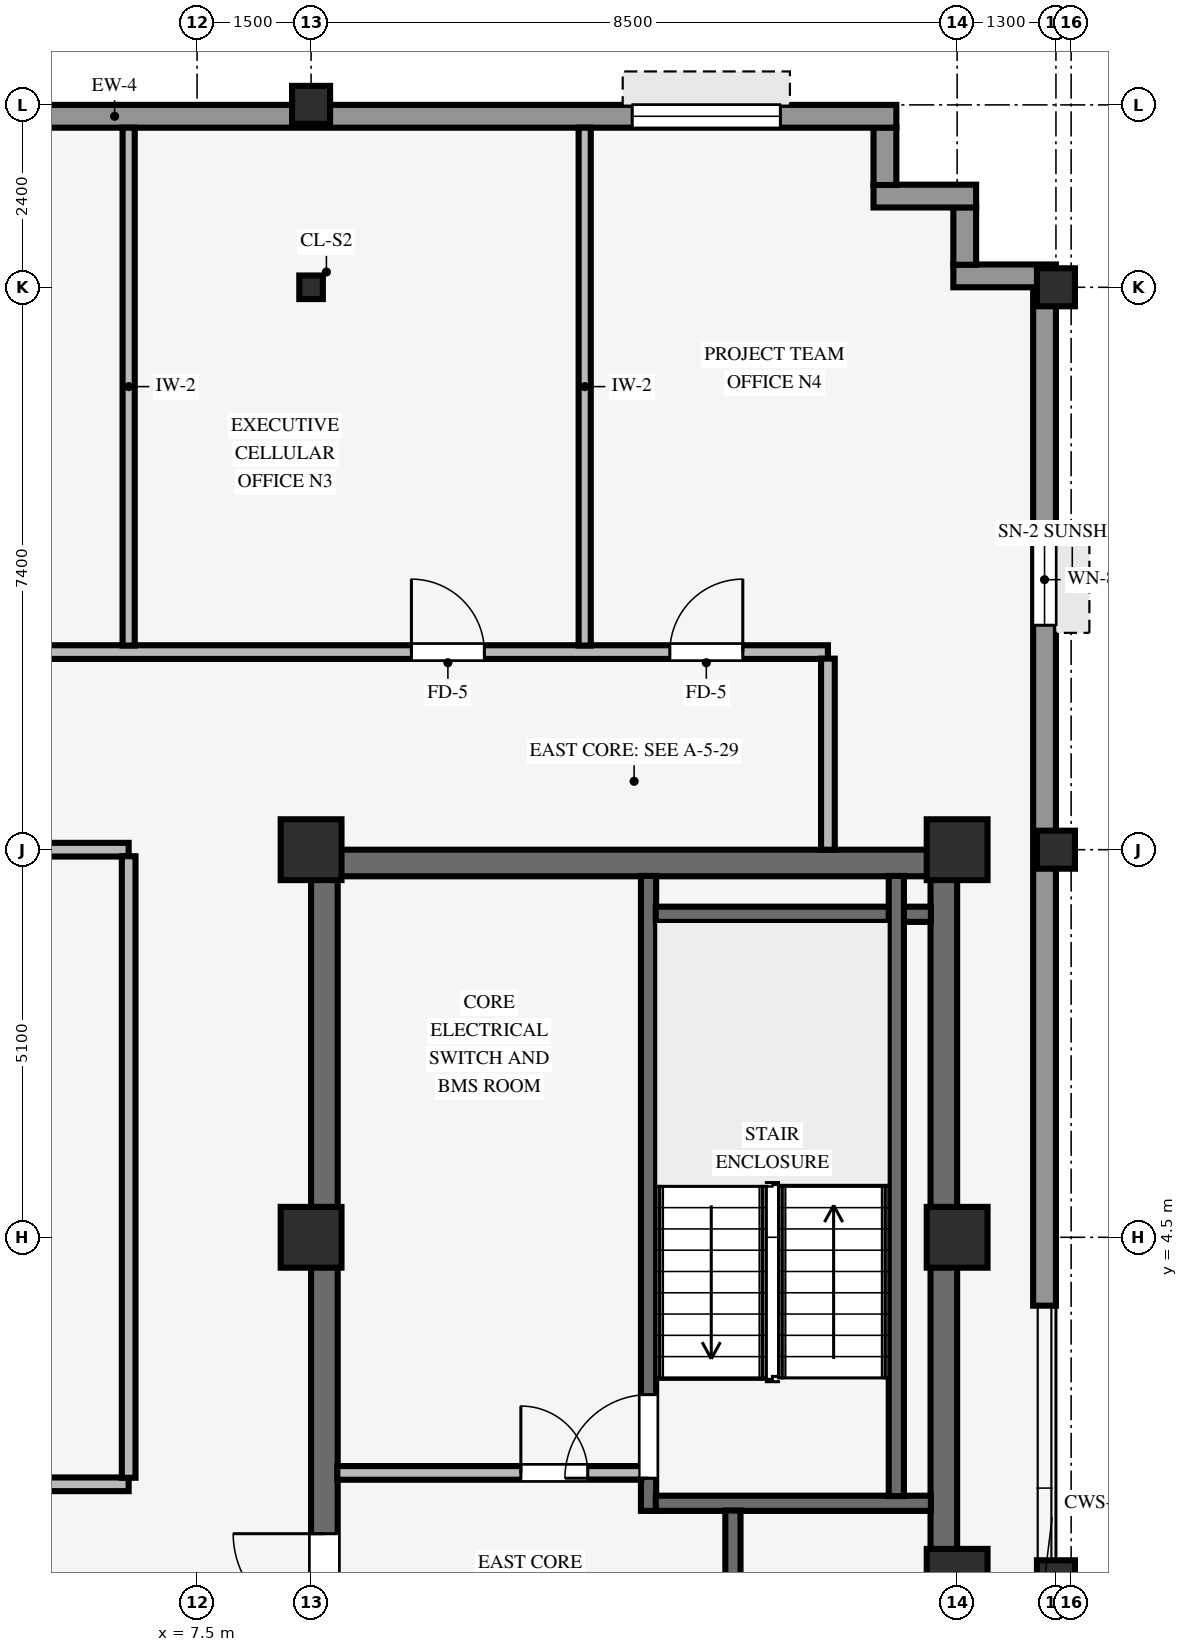
"""IFC4 building model, lengths in metres.
Left out: names, types, materials, properties, quantities, classifications, styles, units other than length and angle.
Written with IfcOpenShell. Run it as: python <this file> out.ifc"""

import sys

from ifc_helpers import new_model, si_unit, direction, frame, frame_2d, origin, origin_2d, place, context, subcontext, project, spatial, rectangle, hollow_rectangle, i_section, extrude, source, transform, mapped, element, fill, save


model = new_model("IFC4")
c1 = context("Model", 3, precision=1e-05, world=origin(), true_north=direction((0.0, 1.0)))
c2 = subcontext(c1, "Body", "Model", "MODEL_VIEW")
j1 = project(units=[si_unit("LENGTHUNIT", "METRE"), si_unit("PLANEANGLEUNIT", "RADIAN")], contexts=[c1])
p1 = place(None, origin())
s1 = spatial("IfcSite", under=j1, at=p1, CompositionType="ELEMENT")
p2 = place(p1, origin())
s2 = spatial("IfcBuilding", under=s1, at=p2, CompositionType="ELEMENT")
p3 = place(p2, frame((0.0, 0.0, 245.65)))
s3 = spatial("IfcBuildingStorey", under=s2, at=p3, CompositionType="ELEMENT", Elevation=245.65)
p4 = place(p3, frame((9.0, 9.425, 0.0), z_axis=(0.0, 0.0, 1.0), x_axis=(1.0, 0.0, 0.0)))
e1 = element("IfcWall", 1, at=p4, inside=s3, PredefinedType="SHEAR", context=c2, shape_type="SweptSolid", body=[
    extrude(rectangle(XDim=8.5, YDim=0.35, at=frame_2d((4.25, 0.0))), origin(), (0.0, 0.0, 1.0), 3.37),
])
p5 = place(p3, frame((9.175, -9.255, 0.0), z_axis=(0.0, 0.0, 1.0), x_axis=(0.0, 1.0, 0.0)))
e2 = element("IfcWall", 2, at=p5, inside=s3, PredefinedType="SHEAR", context=c2, shape_type="SweptSolid", body=[
    extrude(rectangle(XDim=18.51, YDim=0.35, at=frame_2d((9.255, 0.0))), origin(), (0.0, 0.0, 1.0), 3.37),
])
p6 = place(p5, frame((8.655, 0.0, 0.0)))
e3 = element("IfcOpeningElement", 3, at=p6, cuts=e2, PredefinedType="OPENING", context=c2, shape_type="SweptSolid", body=[
    extrude(rectangle(XDim=1.2, YDim=2.15, at=frame_2d((0.6, 1.075))), frame((0.0, 0.185, 0.0), z_axis=(0.0, -1.0, 0.0), x_axis=(1.0, 0.0, 0.0)), (0.0, 0.0, 1.0), 0.37),
])
p7 = place(p3, frame((17.325, -9.255, 0.0), z_axis=(0.0, 0.0, 1.0), x_axis=(0.0, 1.0, 0.0)))
e4 = element("IfcWall", 4, at=p7, inside=s3, PredefinedType="SHEAR", context=c2, shape_type="SweptSolid", body=[
    extrude(rectangle(XDim=18.51, YDim=0.35, at=frame_2d((9.255, 0.0))), origin(), (0.0, 0.0, 1.0), 3.37),
])
for number, where, z_axis, x_axis in (
    (5, (9.0, 4.5, 0.0), (0.0, 0.0, 1.0), (1.0, 0.0, 0.0)),
    (6, (9.0, 9.6, 0.0), (0.0, 0.0, 1.0), (1.0, 0.0, 0.0)),
    (7, (17.5, 4.5, 0.0), (0.0, 0.0, 1.0), (1.0, 0.0, 0.0)),
    (8, (17.5, 9.6, 0.0), (0.0, 0.0, 1.0), (1.0, 0.0, 0.0)),
    (9, (17.5, 0.0, 0.0), (0.0, 0.0, 1.0), (1.0, 0.0, 0.0)),
):
    element("IfcColumn", number, at=place(p3, frame(where, z_axis=z_axis, x_axis=x_axis)), inside=s3, PredefinedType="COLUMN", context=c2, shape_type="SweptSolid", body=[
        extrude(rectangle(XDim=0.8, YDim=0.8, at=origin_2d()), origin(), (0.0, 0.0, 1.0), 3.37),
    ])
for number, where, z_axis, x_axis in (
    (10, (18.8, 0.0, 0.0), (0.0, 0.0, 1.0), (1.0, 0.0, 0.0)),
    (11, (18.8, 9.6, 0.0), (0.0, 0.0, 1.0), (1.0, 0.0, 0.0)),
    (12, (18.8, 17.0, 0.0), (0.0, 0.0, 1.0), (1.0, 0.0, 0.0)),
    (13, (9.0, 19.4, 0.0), (0.0, 0.0, 1.0), (1.0, 0.0, 0.0)),
):
    element("IfcColumn", number, at=place(p3, frame(where, z_axis=z_axis, x_axis=x_axis)), inside=s3, PredefinedType="COLUMN", context=c2, shape_type="SweptSolid", body=[
        extrude(hollow_rectangle(XDim=0.5, YDim=0.5, WallThickness=0.032, InnerFilletRadius=0.032, OuterFilletRadius=0.064, at=origin_2d()), origin(), (0.0, 0.0, 1.0), 3.37),
    ])
p8 = place(p3, frame((9.0, 17.0, 0.0), z_axis=(0.0, 0.0, 1.0), x_axis=(1.0, 0.0, 0.0)))
e14 = element("IfcColumn", 14, at=p8, inside=s3, PredefinedType="COLUMN", context=c2, shape_type="SweptSolid", body=[
    extrude(i_section(OverallWidth=0.31, OverallDepth=0.31, WebThickness=0.015, FlangeThickness=0.015, FilletRadius=0.015, at=origin_2d()), origin(), (0.0, 0.0, 1.0), 3.37),
])
p9 = place(p3, frame((18.65, 3.6, 0.0), z_axis=(0.0, 0.0, 1.0), x_axis=(0.0, 1.0, 0.0)))
e15 = element("IfcWall", 15, at=p9, inside=s3, PredefinedType="STANDARD", context=c2, shape_type="SweptSolid", body=[
    extrude(rectangle(XDim=13.404, YDim=0.3, at=frame_2d((6.702, 0.0))), origin(), (0.0, 0.0, 1.0), 2.705),
])
p10 = place(p9, frame((8.953, 0.0, 0.8)))
e16 = element("IfcOpeningElement", 16, at=p10, cuts=e15, PredefinedType="OPENING", context=c2, shape_type="SweptSolid", body=[
    extrude(rectangle(XDim=1.2, YDim=1.48, at=frame_2d((0.6, 0.74))), frame((0.0, 0.16, 0.0), z_axis=(0.0, -1.0, 0.0), x_axis=(1.0, 0.0, 0.0)), (0.0, 0.0, 1.0), 0.32),
])
p11 = place(p3, frame((17.45, 17.15, 0.0), z_axis=(0.0, 0.0, 1.0), x_axis=(1.0, 0.0, 0.0)))
e17 = element("IfcWall", 17, at=p11, inside=s3, PredefinedType="STANDARD", context=c2, shape_type="SweptSolid", body=[
    extrude(rectangle(XDim=1.35, YDim=0.3, at=frame_2d((0.675, 0.0))), origin(), (0.0, 0.0, 1.0), 2.892),
])
p12 = place(p3, frame((17.6, 17.296, 0.0), z_axis=(0.0, 0.0, 1.0), x_axis=(0.0, 1.0, 0.0)))
e18 = element("IfcWall", 18, at=p12, inside=s3, PredefinedType="STANDARD", context=c2, shape_type="SweptSolid", body=[
    extrude(rectangle(XDim=0.758, YDim=0.3, at=frame_2d((0.379, 0.0))), origin(), (0.0, 0.0, 1.0), 2.892),
])
p13 = place(p3, frame((16.4, 18.2, 0.0), z_axis=(0.0, 0.0, 1.0), x_axis=(1.0, 0.0, 0.0)))
e19 = element("IfcWall", 19, at=p13, inside=s3, PredefinedType="STANDARD", context=c2, shape_type="SweptSolid", body=[
    extrude(rectangle(XDim=1.35, YDim=0.3, at=frame_2d((0.675, 0.0))), origin(), (0.0, 0.0, 1.0), 2.892),
])
p14 = place(p3, frame((16.55, 18.346, 0.0), z_axis=(0.0, 0.0, 1.0), x_axis=(0.0, 1.0, 0.0)))
e20 = element("IfcWall", 20, at=p14, inside=s3, PredefinedType="STANDARD", context=c2, shape_type="SweptSolid", body=[
    extrude(rectangle(XDim=0.758, YDim=0.3, at=frame_2d((0.379, 0.0))), origin(), (0.0, 0.0, 1.0), 2.892),
])
p15 = place(p3, frame((-18.9, 19.25, 0.0), z_axis=(0.0, 0.0, 1.0), x_axis=(1.0, 0.0, 0.0)))
e21 = element("IfcWall", 21, at=p15, inside=s3, PredefinedType="STANDARD", context=c2, shape_type="SweptSolid", body=[
    extrude(rectangle(XDim=35.6, YDim=0.3, at=frame_2d((17.8, 0.0))), origin(), (0.0, 0.0, 1.0), 2.705),
])
p16 = place(p15, frame((13.6, 0.0, 0.0)))
e22 = element("IfcOpeningElement", 22, at=p16, cuts=e21, PredefinedType="OPENING", context=c2, shape_type="SweptSolid", body=[
    extrude(rectangle(XDim=0.98, YDim=2.15, at=frame_2d((0.49, 1.075))), frame((0.0, 0.16, 0.0), z_axis=(0.0, -1.0, 0.0), x_axis=(1.0, 0.0, 0.0)), (0.0, 0.0, 1.0), 0.32),
])
p17 = place(p15, frame((2.425, 0.0, 0.8)))
e23 = element("IfcOpeningElement", 23, at=p17, cuts=e21, PredefinedType="OPENING", context=c2, shape_type="SweptSolid", body=[
    extrude(rectangle(XDim=1.95, YDim=1.48, at=frame_2d((0.975, 0.74))), frame((0.0, 0.16, 0.0), z_axis=(0.0, -1.0, 0.0), x_axis=(1.0, 0.0, 0.0)), (0.0, 0.0, 1.0), 0.32),
])
p18 = place(p15, frame((7.225, 0.0, 0.8)))
e24 = element("IfcOpeningElement", 24, at=p18, cuts=e21, PredefinedType="OPENING", context=c2, shape_type="SweptSolid", body=[
    extrude(rectangle(XDim=1.95, YDim=1.48, at=frame_2d((0.975, 0.74))), frame((0.0, 0.16, 0.0), z_axis=(0.0, -1.0, 0.0), x_axis=(1.0, 0.0, 0.0)), (0.0, 0.0, 1.0), 0.32),
])
p19 = place(p15, frame((15.925, 0.0, 0.8)))
e25 = element("IfcOpeningElement", 25, at=p19, cuts=e21, PredefinedType="OPENING", context=c2, shape_type="SweptSolid", body=[
    extrude(rectangle(XDim=1.95, YDim=1.48, at=frame_2d((0.975, 0.74))), frame((0.0, 0.16, 0.0), z_axis=(0.0, -1.0, 0.0), x_axis=(1.0, 0.0, 0.0)), (0.0, 0.0, 1.0), 0.32),
])
p20 = place(p15, frame((21.625, 0.0, 0.8)))
e26 = element("IfcOpeningElement", 26, at=p20, cuts=e21, PredefinedType="OPENING", context=c2, shape_type="SweptSolid", body=[
    extrude(rectangle(XDim=1.95, YDim=1.48, at=frame_2d((0.975, 0.74))), frame((0.0, 0.16, 0.0), z_axis=(0.0, -1.0, 0.0), x_axis=(1.0, 0.0, 0.0)), (0.0, 0.0, 1.0), 0.32),
])
p21 = place(p15, frame((32.125, 0.0, 0.8)))
e27 = element("IfcOpeningElement", 27, at=p21, cuts=e21, PredefinedType="OPENING", context=c2, shape_type="SweptSolid", body=[
    extrude(rectangle(XDim=1.95, YDim=1.48, at=frame_2d((0.975, 0.74))), frame((0.0, 0.16, 0.0), z_axis=(0.0, -1.0, 0.0), x_axis=(1.0, 0.0, 0.0)), (0.0, 0.0, 1.0), 0.32),
])
p22 = place(p3, frame((13.44, 0.9, 0.0), z_axis=(0.0, 0.0, 1.0), x_axis=(0.0, 1.0, 0.0)))
e28 = element("IfcWall", 28, at=p22, inside=s3, PredefinedType="SHEAR", context=c2, shape_type="SweptSolid", body=[
    extrude(rectangle(XDim=8.355, YDim=0.2, at=frame_2d((4.177, 0.0))), origin(), (0.0, 0.0, 1.0), 3.37),
])
p23 = place(p22, frame((0.43, 0.0, 0.0)))
e29 = element("IfcOpeningElement", 29, at=p23, cuts=e28, PredefinedType="OPENING", context=c2, shape_type="SweptSolid", body=[
    extrude(rectangle(XDim=1.1, YDim=2.15, at=frame_2d((0.55, 1.075))), frame((0.0, 0.11, 0.0), z_axis=(0.0, -1.0, 0.0), x_axis=(1.0, 0.0, 0.0)), (0.0, 0.0, 1.0), 0.22),
])
for number, where, z_axis, x_axis in (
    (30, (13.535, 1.0, 0.0), (0.0, 0.0, 1.0), (1.0, 0.0, 0.0)),
    (31, (13.535, 8.75, 0.0), (0.0, 0.0, 1.0), (1.0, 0.0, 0.0)),
):
    element("IfcWall", number, at=place(p3, frame(where, z_axis=z_axis, x_axis=x_axis)), inside=s3, PredefinedType="SHEAR", context=c2, shape_type="SweptSolid", body=[
        extrude(rectangle(XDim=3.62, YDim=0.2, at=frame_2d((1.81, 0.0))), origin(), (0.0, 0.0, 1.0), 3.37),
    ])
p24 = place(p3, frame((16.7, 1.095, 0.0), z_axis=(0.0, 0.0, 1.0), x_axis=(0.0, 1.0, 0.0)))
e32 = element("IfcWall", 32, at=p24, inside=s3, PredefinedType="SHEAR", context=c2, shape_type="SweptSolid", body=[
    extrude(rectangle(XDim=8.16, YDim=0.2, at=frame_2d((4.08, 0.0))), origin(), (0.0, 0.0, 1.0), 3.37),
])
p25 = place(p3, frame((14.55, -9.255, 0.0), z_axis=(0.0, 0.0, 1.0), x_axis=(0.0, 1.0, 0.0)))
e33 = element("IfcWall", 33, at=p25, inside=s3, PredefinedType="SHEAR", context=c2, shape_type="SweptSolid", body=[
    extrude(rectangle(XDim=10.16, YDim=0.2, at=frame_2d((5.08, 0.0))), origin(), (0.0, 0.0, 1.0), 3.37),
])
p26 = place(p25, frame((6.615, 0.0, 0.0)))
e34 = element("IfcOpeningElement", 34, at=p26, cuts=e33, PredefinedType="OPENING", context=c2, shape_type="SweptSolid", body=[
    extrude(rectangle(XDim=0.88, YDim=2.1, at=frame_2d((0.44, 1.05))), frame((0.0, 0.11, 0.0), z_axis=(0.0, -1.0, 0.0), x_axis=(1.0, 0.0, 0.0)), (0.0, 0.0, 1.0), 0.22),
])
p27 = place(p25, frame((0.98, 0.0, 0.0)))
e35 = element("IfcOpeningElement", 35, at=p27, cuts=e33, PredefinedType="OPENING", context=c2, shape_type="SweptSolid", body=[
    extrude(rectangle(XDim=1.15, YDim=2.15, at=frame_2d((0.575, 1.075))), frame((0.0, 0.11, 0.0), z_axis=(0.0, -1.0, 0.0), x_axis=(1.0, 0.0, 0.0)), (0.0, 0.0, 1.0), 0.22),
])
p28 = place(p3, frame((9.345, 1.4, 0.0), z_axis=(0.0, 0.0, 1.0), x_axis=(1.0, 0.0, 0.0)))
e36 = element("IfcWall", 36, at=p28, inside=s3, PredefinedType="PARTITIONING", context=c2, shape_type="SweptSolid", body=[
    extrude(rectangle(XDim=4.0, YDim=0.18, at=frame_2d((2.0, 0.0))), origin(), (0.0, 0.0, 1.0), 3.36),
])
p29 = place(p28, frame((2.415, 0.0, 0.0)))
e37 = element("IfcOpeningElement", 37, at=p29, cuts=e36, PredefinedType="OPENING", context=c2, shape_type="SweptSolid", body=[
    extrude(rectangle(XDim=0.88, YDim=2.1, at=frame_2d((0.44, 1.05))), frame((0.0, 0.1, 0.0), z_axis=(0.0, -1.0, 0.0), x_axis=(1.0, 0.0, 0.0)), (0.0, 0.0, 1.0), 0.2),
])
p30 = place(p3, frame((-6.6, 1.25, 0.0), z_axis=(0.0, 0.0, 1.0), x_axis=(1.0, 0.0, 0.0)))
e38 = element("IfcWall", 38, at=p30, inside=s3, PredefinedType="PARTITIONING", context=c2, shape_type="SweptSolid", body=[
    extrude(rectangle(XDim=13.2, YDim=0.18, at=frame_2d((6.6, 0.0))), origin(), (0.0, 0.0, 1.0), 3.36),
])
p31 = place(p30, frame((6.12, 0.0, 0.0)))
e39 = element("IfcOpeningElement", 39, at=p31, cuts=e38, PredefinedType="OPENING", context=c2, shape_type="SweptSolid", body=[
    extrude(rectangle(XDim=0.96, YDim=2.1, at=frame_2d((0.48, 1.05))), frame((0.0, 0.1, 0.0), z_axis=(0.0, -1.0, 0.0), x_axis=(1.0, 0.0, 0.0)), (0.0, 0.0, 1.0), 0.2),
])
p32 = place(p3, frame((0.151, 9.6, 0.0), z_axis=(0.0, 0.0, 1.0), x_axis=(1.0, 0.0, 0.0)))
e40 = element("IfcWall", 40, at=p32, inside=s3, PredefinedType="PARTITIONING", context=c2, shape_type="SweptSolid", body=[
    extrude(rectangle(XDim=6.449, YDim=0.18, at=frame_2d((3.225, 0.0))), origin(), (0.0, 0.0, 1.0), 2.405),
])
p33 = place(p3, frame((-15.0, 12.2, 0.0), z_axis=(0.0, 0.0, 1.0), x_axis=(1.0, 0.0, 0.0)))
e41 = element("IfcWall", 41, at=p33, inside=s3, PredefinedType="PARTITIONING", context=c2, shape_type="SweptSolid", body=[
    extrude(rectangle(XDim=30.8, YDim=0.18, at=frame_2d((15.4, 0.0))), origin(), (0.0, 0.0, 1.0), 3.36),
])
p34 = place(p33, frame((2.52, 0.0, 0.0)))
e42 = element("IfcOpeningElement", 42, at=p34, cuts=e41, PredefinedType="OPENING", context=c2, shape_type="SweptSolid", body=[
    extrude(rectangle(XDim=0.96, YDim=2.1, at=frame_2d((0.48, 1.05))), frame((0.0, 0.1, 0.0), z_axis=(0.0, -1.0, 0.0), x_axis=(1.0, 0.0, 0.0)), (0.0, 0.0, 1.0), 0.2),
])
p35 = place(p33, frame((19.22, 0.0, 0.0)))
e43 = element("IfcOpeningElement", 43, at=p35, cuts=e41, PredefinedType="OPENING", context=c2, shape_type="SweptSolid", body=[
    extrude(rectangle(XDim=0.96, YDim=2.1, at=frame_2d((0.48, 1.05))), frame((0.0, 0.1, 0.0), z_axis=(0.0, -1.0, 0.0), x_axis=(1.0, 0.0, 0.0)), (0.0, 0.0, 1.0), 0.2),
])
p36 = place(p33, frame((25.32, 0.0, 0.0)))
e44 = element("IfcOpeningElement", 44, at=p36, cuts=e41, PredefinedType="OPENING", context=c2, shape_type="SweptSolid", body=[
    extrude(rectangle(XDim=0.96, YDim=2.1, at=frame_2d((0.48, 1.05))), frame((0.0, 0.1, 0.0), z_axis=(0.0, -1.0, 0.0), x_axis=(1.0, 0.0, 0.0)), (0.0, 0.0, 1.0), 0.2),
])
p37 = place(p33, frame((28.72, 0.0, 0.0)))
e45 = element("IfcOpeningElement", 45, at=p37, cuts=e41, PredefinedType="OPENING", context=c2, shape_type="SweptSolid", body=[
    extrude(rectangle(XDim=0.96, YDim=2.1, at=frame_2d((0.48, 1.05))), frame((0.0, 0.1, 0.0), z_axis=(0.0, -1.0, 0.0), x_axis=(1.0, 0.0, 0.0)), (0.0, 0.0, 1.0), 0.2),
])
p38 = place(p33, frame((9.35, 0.0, 0.0)))
e46 = element("IfcOpeningElement", 46, at=p38, cuts=e41, PredefinedType="OPENING", context=c2, shape_type="SweptSolid", body=[
    extrude(rectangle(XDim=0.9, YDim=2.1, at=frame_2d((0.45, 1.05))), frame((0.0, 0.1, 0.0), z_axis=(0.0, -1.0, 0.0), x_axis=(1.0, 0.0, 0.0)), (0.0, 0.0, 1.0), 0.2),
])
p39 = place(p33, frame((12.15, 0.0, 0.0)))
e47 = element("IfcOpeningElement", 47, at=p39, cuts=e41, PredefinedType="OPENING", context=c2, shape_type="SweptSolid", body=[
    extrude(rectangle(XDim=0.9, YDim=2.1, at=frame_2d((0.45, 1.05))), frame((0.0, 0.1, 0.0), z_axis=(0.0, -1.0, 0.0), x_axis=(1.0, 0.0, 0.0)), (0.0, 0.0, 1.0), 0.2),
])
p40 = place(p33, frame((16.25, 0.0, 0.0)))
e48 = element("IfcOpeningElement", 48, at=p40, cuts=e41, PredefinedType="OPENING", context=c2, shape_type="SweptSolid", body=[
    extrude(rectangle(XDim=0.9, YDim=2.1, at=frame_2d((0.45, 1.05))), frame((0.0, 0.1, 0.0), z_axis=(0.0, -1.0, 0.0), x_axis=(1.0, 0.0, 0.0)), (0.0, 0.0, 1.0), 0.2),
])
p41 = place(p3, frame((6.6, 1.336, 0.0), z_axis=(0.0, 0.0, 1.0), x_axis=(0.0, 1.0, 0.0)))
e49 = element("IfcWall", 49, at=p41, inside=s3, PredefinedType="PARTITIONING", context=c2, shape_type="SweptSolid", body=[
    extrude(rectangle(XDim=8.178, YDim=0.18, at=frame_2d((4.089, 0.0))), origin(), (0.0, 0.0, 1.0), 3.36),
])
for number, where, z_axis, x_axis in (
    (50, (6.6, 12.286, 0.0), (0.0, 0.0, 1.0), (0.0, 1.0, 0.0)),
    (51, (12.6, 12.286, 0.0), (0.0, 0.0, 1.0), (0.0, 1.0, 0.0)),
):
    element("IfcWall", number, at=place(p3, frame(where, z_axis=z_axis, x_axis=x_axis)), inside=s3, PredefinedType="PARTITIONING", context=c2, shape_type="SweptSolid", body=[
        extrude(rectangle(XDim=6.814, YDim=0.16, at=frame_2d((3.407, 0.0))), origin(), (0.0, 0.0, 1.0), 3.36),
    ])
p42 = place(p3, frame((15.8, 9.6, 0.0), z_axis=(0.0, 0.0, 1.0), x_axis=(0.0, 1.0, 0.0)))
e52 = element("IfcWall", 52, at=p42, inside=s3, PredefinedType="PARTITIONING", context=c2, shape_type="SweptSolid", body=[
    extrude(rectangle(XDim=2.514, YDim=0.18, at=frame_2d((1.257, 0.0))), origin(), (0.0, 0.0, 1.0), 3.36),
])
m1 = source(origin(), c2, "Body", "SweptSolid", [
    extrude(rectangle(XDim=1.2, YDim=1.48, at=frame_2d((0.6, 0.74))), frame((0.0, 0.03, 0.0), z_axis=(0.0, -1.0, 0.0), x_axis=(1.0, 0.0, 0.0)), (0.0, 0.0, 1.0), 0.06),
])
p43 = place(p10, origin())
e53 = element("IfcWindow", 53, at=p43, inside=s3, PartitioningType="SINGLE_PANEL", PredefinedType="WINDOW", context=c2, shape_type="MappedRepresentation", body=[
    mapped(m1, transform((0.0, 0.0, 0.0), scale=1.0)),
])
fill(e16, e53)
m2 = source(origin(), c2, "Body", "SweptSolid", [
    extrude(rectangle(XDim=1.95, YDim=1.48, at=frame_2d((0.975, 0.74))), frame((0.0, 0.03, 0.0), z_axis=(0.0, -1.0, 0.0), x_axis=(1.0, 0.0, 0.0)), (0.0, 0.0, 1.0), 0.06),
])
p44 = place(p21, origin())
e54 = element("IfcWindow", 54, at=p44, inside=s3, PartitioningType="SINGLE_PANEL", PredefinedType="WINDOW", context=c2, shape_type="MappedRepresentation", body=[
    mapped(m2, transform((0.0, 0.0, 0.0), scale=1.0)),
])
fill(e27, e54)
m3 = source(origin(), c2, "Body", "SweptSolid", [
    extrude(rectangle(XDim=1.1, YDim=2.15, at=frame_2d((0.55, 1.075))), frame((0.0, 0.025, 0.0), z_axis=(0.0, -1.0, 0.0), x_axis=(1.0, 0.0, 0.0)), (0.0, 0.0, 1.0), 0.05),
])
p45 = place(p23, origin())
e55 = element("IfcDoor", 55, at=p45, inside=s3, OperationType="SINGLE_SWING_LEFT", PredefinedType="DOOR", context=c2, shape_type="MappedRepresentation", body=[
    mapped(m3, transform((0.0, 0.0, 0.0), scale=1.0)),
])
fill(e29, e55)
m4 = source(origin(), c2, "Body", "SweptSolid", [
    extrude(rectangle(XDim=1.2, YDim=2.15, at=frame_2d((0.6, 1.075))), frame((0.0, 0.025, 0.0), z_axis=(0.0, -1.0, 0.0), x_axis=(1.0, 0.0, 0.0)), (0.0, 0.0, 1.0), 0.05),
])
p46 = place(p6, origin())
e56 = element("IfcDoor", 56, at=p46, inside=s3, OperationType="SINGLE_SWING_RIGHT", PredefinedType="DOOR", context=c2, shape_type="MappedRepresentation", body=[
    mapped(m4, transform((0.0, 0.0, 0.0), scale=1.0)),
])
fill(e3, e56)
m5 = source(origin(), c2, "Body", "SweptSolid", [
    extrude(rectangle(XDim=0.88, YDim=2.1, at=frame_2d((0.44, 1.05))), frame((0.0, 0.025, 0.0), z_axis=(0.0, -1.0, 0.0), x_axis=(1.0, 0.0, 0.0)), (0.0, 0.0, 1.0), 0.05),
])
p47 = place(p29, origin())
e57 = element("IfcDoor", 57, at=p47, inside=s3, OperationType="SINGLE_SWING_LEFT", PredefinedType="DOOR", context=c2, shape_type="MappedRepresentation", body=[
    mapped(m5, transform((0.0, 0.0, 0.0), scale=1.0)),
])
fill(e37, e57)
m6 = source(origin(), c2, "Body", "SweptSolid", [
    extrude(rectangle(XDim=0.96, YDim=2.1, at=frame_2d((0.48, 1.05))), frame((0.0, 0.025, 0.0), z_axis=(0.0, -1.0, 0.0), x_axis=(1.0, 0.0, 0.0)), (0.0, 0.0, 1.0), 0.05),
])
p48 = place(p36, origin())
e58 = element("IfcDoor", 58, at=p48, inside=s3, OperationType="SINGLE_SWING_LEFT", PredefinedType="DOOR", context=c2, shape_type="MappedRepresentation", body=[
    mapped(m6, transform((0.0, 0.0, 0.0), scale=1.0)),
])
fill(e44, e58)
p49 = place(p37, origin())
e59 = element("IfcDoor", 59, at=p49, inside=s3, OperationType="SINGLE_SWING_RIGHT", PredefinedType="DOOR", context=c2, shape_type="MappedRepresentation", body=[
    mapped(m6, transform((0.0, 0.0, 0.0), scale=1.0)),
])
fill(e45, e59)
save(model, sys.argv[1])
